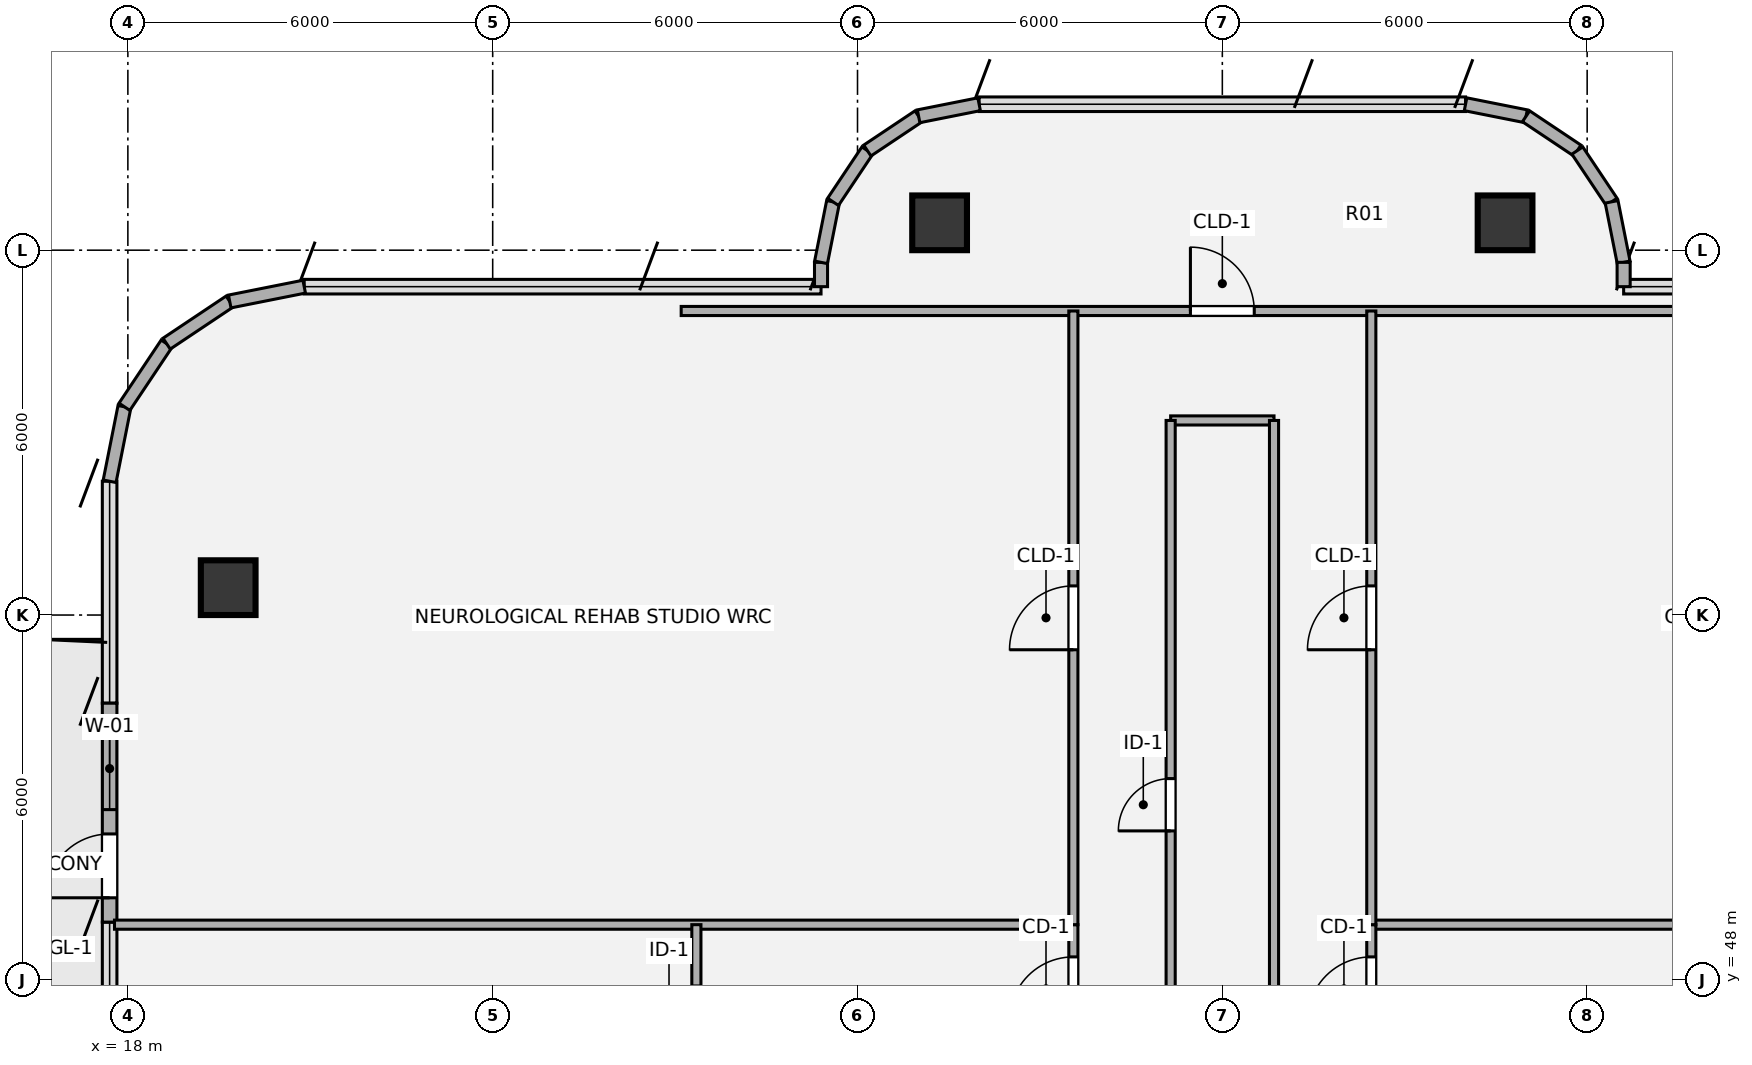
"""IFC4 building model, lengths in metres.
Left out: names, types, materials, properties, quantities, classifications, styles, units other than length and angle.
Written with IfcOpenShell. Run it as: python <this file> out.ifc"""

import sys

from ifc_helpers import new_model, si_unit, direction, frame, frame_2d, origin, origin_2d, place, context, subcontext, project, spatial, rectangle, hollow_circle, extrude, source, transform, mapped, element, fill, save


model = new_model("IFC4")
c1 = context("Model", 3, precision=1e-05, world=origin(), true_north=direction((0.0, 1.0)))
c2 = subcontext(c1, "Body", "Model", "MODEL_VIEW")
j1 = project(units=[si_unit("LENGTHUNIT", "METRE"), si_unit("PLANEANGLEUNIT", "RADIAN")], contexts=[c1])
p1 = place(None, origin())
s1 = spatial("IfcSite", under=j1, at=p1, CompositionType="ELEMENT")
p2 = place(p1, origin())
s2 = spatial("IfcBuilding", under=s1, at=p2, CompositionType="ELEMENT")
p3 = place(p2, frame((0.0, 0.0, 249.48)))
s3 = spatial("IfcBuildingStorey", under=s2, at=p3, CompositionType="ELEMENT", Elevation=249.48)
m1 = source(origin(), c2, "Body", "SweptSolid", [
    extrude(hollow_circle(Radius=0.45, WallThickness=0.032, at=origin_2d()), origin(), (0.0, 0.0, 1.0), 3.78),
])
for number, where, z_axis, x_axis in (
    (1, (19.65, 54.45, 0.0), (0.0, 0.0, 1.0), (1.0, 0.0, 0.0)),
    (2, (31.35, 60.45, 0.0), (0.0, 0.0, 1.0), (1.0, 0.0, 0.0)),
    (3, (40.65, 60.45, 0.0), (0.0, 0.0, 1.0), (1.0, 0.0, 0.0)),
):
    element("IfcColumn", number, at=place(p3, frame(where, z_axis=z_axis, x_axis=x_axis)), inside=s3, PredefinedType="COLUMN", context=c2, shape_type="MappedRepresentation", body=[
        mapped(m1, transform((0.0, 0.0, 0.0), x_axis=(1.0, 0.0, 0.0), y_axis=(0.0, 1.0, 0.0), z_axis=(0.0, 0.0, 1.0), scale=1.0)),
    ])
p4 = place(p3, frame((17.7, 48.95, 0.0), z_axis=(0.0, 0.0, 1.0), x_axis=(0.0, 1.0, 0.0)))
e4 = element("IfcWall", 4, at=p4, inside=s3, PredefinedType="SOLIDWALL", context=c2, shape_type="SweptSolid", body=[
    extrude(rectangle(XDim=3.6, YDim=0.24, at=frame_2d((1.8, 0.0))), origin(), (0.0, 0.0, 1.0), 3.53),
])
p5 = place(p4, frame((0.4, 0.0, 0.0)))
e5 = element("IfcOpeningElement", 5, at=p5, cuts=e4, PredefinedType="OPENING", context=c2, shape_type="SweptSolid", body=[
    extrude(rectangle(XDim=1.05, YDim=2.15, at=origin_2d()), frame((0.525, 0.13, 1.075), z_axis=(0.0, -1.0, 0.0), x_axis=(1.0, 0.0, 0.0)), (0.0, 0.0, 1.0), 0.26),
])
p6 = place(p4, frame((1.85, 0.0, 0.85)))
e6 = element("IfcOpeningElement", 6, at=p6, cuts=e4, PredefinedType="OPENING", context=c2, shape_type="SweptSolid", body=[
    extrude(rectangle(XDim=1.35, YDim=1.35, at=origin_2d()), frame((0.675, 0.13, 0.675), z_axis=(0.0, -1.0, 0.0), x_axis=(1.0, 0.0, 0.0)), (0.0, 0.0, 1.0), 0.26),
])
for number, where, z_axis, x_axis in (
    (7, (17.7, 56.2, 0.0), (0.0, 0.0, 1.0), (0.195, 0.981, 0.0)),
    (8, (17.944, 57.425, 0.0), (0.0, 0.0, 1.0), (0.556, 0.831, 0.0)),
    (9, (18.637, 58.463, 0.0), (0.0, 0.0, 1.0), (0.831, 0.556, 0.0)),
    (10, (19.675, 59.156, 0.0), (0.0, 0.0, 1.0), (0.981, 0.195, 0.0)),
):
    element("IfcWall", number, at=place(p3, frame(where, z_axis=z_axis, x_axis=x_axis)), inside=s3, PredefinedType="SOLIDWALL", context=c2, shape_type="SweptSolid", body=[
        extrude(rectangle(XDim=1.249, YDim=0.215, at=frame_2d((0.624, 0.0))), origin(), (0.0, 0.0, 1.0), 3.53),
    ])
p7 = place(p3, frame((29.4, 59.4, 0.0), z_axis=(0.0, 0.0, 1.0), x_axis=(0.0, 1.0, 0.0)))
e11 = element("IfcWall", 11, at=p7, inside=s3, PredefinedType="SOLIDWALL", context=c2, shape_type="SweptSolid", body=[
    extrude(rectangle(XDim=0.4, YDim=0.215, at=frame_2d((0.2, 0.0))), origin(), (0.0, 0.0, 1.0), 3.53),
])
p8 = place(p3, frame((29.4, 59.8, 0.0), z_axis=(0.0, 0.0, 1.0), x_axis=(0.195190360752, 0.980765376158, 0.0)))
e12 = element("IfcWall", 12, at=p8, inside=s3, PredefinedType="SOLIDWALL", context=c2, shape_type="SweptSolid", body=[
    extrude(rectangle(XDim=1.014, YDim=0.215, at=frame_2d((0.507, 0.0))), origin(), (0.0, 0.0, 1.0), 3.53),
])
p9 = place(p3, frame((29.598, 60.795, 0.0), z_axis=(0.0, 0.0, 1.0), x_axis=(0.555643898837, 0.831420385657, 0.0)))
e13 = element("IfcWall", 13, at=p9, inside=s3, PredefinedType="SOLIDWALL", context=c2, shape_type="SweptSolid", body=[
    extrude(rectangle(XDim=1.015, YDim=0.215, at=frame_2d((0.507, 0.0))), origin(), (0.0, 0.0, 1.0), 3.53),
])
p10 = place(p3, frame((30.162, 61.638, 0.0), z_axis=(0.0, 0.0, 1.0), x_axis=(0.831346067305, 0.555755086685, 0.0)))
e14 = element("IfcWall", 14, at=p10, inside=s3, PredefinedType="SOLIDWALL", context=c2, shape_type="SweptSolid", body=[
    extrude(rectangle(XDim=1.014, YDim=0.215, at=frame_2d((0.507, 0.0))), origin(), (0.0, 0.0, 1.0), 3.53),
])
for number, where, z_axis, x_axis in (
    (15, (31.005, 62.202, 0.0), (0.0, 0.0, 1.0), (0.981, 0.195, 0.0)),
    (16, (40.0, 62.4, 0.0), (0.0, 0.0, 1.0), (0.981, -0.195, 0.0)),
):
    element("IfcWall", number, at=place(p3, frame(where, z_axis=z_axis, x_axis=x_axis)), inside=s3, PredefinedType="SOLIDWALL", context=c2, shape_type="SweptSolid", body=[
        extrude(rectangle(XDim=1.015, YDim=0.215, at=frame_2d((0.507, 0.0))), origin(), (0.0, 0.0, 1.0), 3.53),
    ])
p11 = place(p3, frame((40.995, 62.202, 0.0), z_axis=(0.0, 0.0, 1.0), x_axis=(0.831346067305, -0.555755086685, 0.0)))
e17 = element("IfcWall", 17, at=p11, inside=s3, PredefinedType="SOLIDWALL", context=c2, shape_type="SweptSolid", body=[
    extrude(rectangle(XDim=1.014, YDim=0.215, at=frame_2d((0.507, 0.0))), origin(), (0.0, 0.0, 1.0), 3.53),
])
p12 = place(p3, frame((41.838, 61.638, 0.0), z_axis=(0.0, 0.0, 1.0), x_axis=(0.555643898837, -0.831420385657, 0.0)))
e18 = element("IfcWall", 18, at=p12, inside=s3, PredefinedType="SOLIDWALL", context=c2, shape_type="SweptSolid", body=[
    extrude(rectangle(XDim=1.015, YDim=0.215, at=frame_2d((0.507, 0.0))), origin(), (0.0, 0.0, 1.0), 3.53),
])
p13 = place(p3, frame((42.402, 60.795, 0.0), z_axis=(0.0, 0.0, 1.0), x_axis=(0.195190360752, -0.980765376158, 0.0)))
e19 = element("IfcWall", 19, at=p13, inside=s3, PredefinedType="SOLIDWALL", context=c2, shape_type="SweptSolid", body=[
    extrude(rectangle(XDim=1.014, YDim=0.215, at=frame_2d((0.507, 0.0))), origin(), (0.0, 0.0, 1.0), 3.53),
])
p14 = place(p3, frame((42.6, 59.8, 0.0), z_axis=(0.0, 0.0, 1.0), x_axis=(0.0, -1.0, 0.0)))
e20 = element("IfcWall", 20, at=p14, inside=s3, PredefinedType="SOLIDWALL", context=c2, shape_type="SweptSolid", body=[
    extrude(rectangle(XDim=0.4, YDim=0.215, at=frame_2d((0.2, 0.0))), origin(), (0.0, 0.0, 1.0), 3.53),
])
for number, where, z_axis, x_axis in (
    (21, (17.78, 48.908, 0.0), (0.0, 0.0, 1.0), (1.0, 0.0, 0.0)),
    (22, (38.45, 48.908, 0.0), (0.0, 0.0, 1.0), (1.0, 0.0, 0.0)),
):
    element("IfcWall", number, at=place(p3, frame(where, z_axis=z_axis, x_axis=x_axis)), inside=s3, PredefinedType="PARTITIONING", context=c2, shape_type="SweptSolid", body=[
        extrude(rectangle(XDim=15.77, YDim=0.15, at=frame_2d((7.885, 0.0))), origin(), (0.0, 0.0, 1.0), 2.982),
    ])
p15 = place(p3, frame((35.15, 57.2, 0.0), z_axis=(0.0, 0.0, 1.0), x_axis=(1.0, 0.0, 0.0)))
e23 = element("IfcWall", 23, at=p15, inside=s3, PredefinedType="PARTITIONING", context=c2, shape_type="SweptSolid", body=[
    extrude(rectangle(XDim=1.7, YDim=0.15, at=frame_2d((0.85, 0.0))), origin(), (0.0, 0.0, 1.0), 3.308),
])
p16 = place(p3, frame((27.1, 59.0, 0.0), z_axis=(0.0, 0.0, 1.0), x_axis=(1.0, 0.0, 0.0)))
e24 = element("IfcWall", 24, at=p16, inside=s3, PredefinedType="PARTITIONING", context=c2, shape_type="SweptSolid", body=[
    extrude(rectangle(XDim=17.8, YDim=0.15, at=frame_2d((8.9, 0.0))), origin(), (0.0, 0.0, 1.0), 3.308),
])
p17 = place(p16, frame((8.375, 0.0, 0.0)))
e25 = element("IfcOpeningElement", 25, at=p17, cuts=e24, PredefinedType="OPENING", context=c2, shape_type="SweptSolid", body=[
    extrude(rectangle(XDim=1.05, YDim=2.1, at=origin_2d()), frame((0.525, 0.085, 1.05), z_axis=(0.0, -1.0, 0.0), x_axis=(1.0, 0.0, 0.0)), (0.0, 0.0, 1.0), 0.17),
])
p18 = place(p3, frame((27.35, 45.254, 0.0), z_axis=(0.0, 0.0, 1.0), x_axis=(0.0, 1.0, 0.0)))
e26 = element("IfcWall", 26, at=p18, inside=s3, PredefinedType="PARTITIONING", context=c2, shape_type="SweptSolid", body=[
    extrude(rectangle(XDim=3.654, YDim=0.15, at=frame_2d((1.827, 0.0))), origin(), (0.0, 0.0, 1.0), 3.5),
])
p19 = place(p18, frame((1.786, 0.0, 0.0)))
e27 = element("IfcOpeningElement", 27, at=p19, cuts=e26, PredefinedType="OPENING", context=c2, shape_type="SweptSolid", body=[
    extrude(rectangle(XDim=0.86, YDim=2.1, at=origin_2d()), frame((0.43, 0.085, 1.05), z_axis=(0.0, -1.0, 0.0), x_axis=(1.0, 0.0, 0.0)), (0.0, 0.0, 1.0), 0.17),
])
p20 = place(p3, frame((33.55, 46.789, 0.0), z_axis=(0.0, 0.0, 1.0), x_axis=(0.0, 1.0, 0.0)))
e28 = element("IfcWall", 28, at=p20, inside=s3, PredefinedType="PARTITIONING", context=c2, shape_type="SweptSolid", body=[
    extrude(rectangle(XDim=2.119, YDim=0.15, at=frame_2d((1.06, 0.0))), origin(), (0.0, 0.0, 1.0), 3.5),
])
p21 = place(p20, frame((0.539, 0.0, 0.0)))
e29 = element("IfcOpeningElement", 29, at=p21, cuts=e28, PredefinedType="OPENING", context=c2, shape_type="SweptSolid", body=[
    extrude(rectangle(XDim=1.05, YDim=2.1, at=origin_2d()), frame((0.525, 0.085, 1.05), z_axis=(0.0, -1.0, 0.0), x_axis=(1.0, 0.0, 0.0)), (0.0, 0.0, 1.0), 0.17),
])
p22 = place(p3, frame((33.55, 48.908, 0.0), z_axis=(0.0, 0.0, 1.0), x_axis=(0.0, 1.0, 0.0)))
e30 = element("IfcWall", 30, at=p22, inside=s3, PredefinedType="PARTITIONING", context=c2, shape_type="SweptSolid", body=[
    extrude(rectangle(XDim=10.092, YDim=0.15, at=frame_2d((5.046, 0.0))), origin(), (0.0, 0.0, 1.0), 3.5),
])
p23 = place(p22, frame((4.521, 0.0, 0.0)))
e31 = element("IfcOpeningElement", 31, at=p23, cuts=e30, PredefinedType="OPENING", context=c2, shape_type="SweptSolid", body=[
    extrude(rectangle(XDim=1.05, YDim=2.1, at=origin_2d()), frame((0.525, 0.085, 1.05), z_axis=(0.0, -1.0, 0.0), x_axis=(1.0, 0.0, 0.0)), (0.0, 0.0, 1.0), 0.17),
])
p24 = place(p3, frame((35.15, 44.62, 0.0), z_axis=(0.0, 0.0, 1.0), x_axis=(0.0, 1.0, 0.0)))
e32 = element("IfcWall", 32, at=p24, inside=s3, PredefinedType="PARTITIONING", context=c2, shape_type="SweptSolid", body=[
    extrude(rectangle(XDim=12.58, YDim=0.15, at=frame_2d((6.29, 0.0))), origin(), (0.0, 0.0, 1.0), 3.5),
])
p25 = place(p24, frame((5.83, 0.0, 0.0)))
e33 = element("IfcOpeningElement", 33, at=p25, cuts=e32, PredefinedType="OPENING", context=c2, shape_type="SweptSolid", body=[
    extrude(rectangle(XDim=0.86, YDim=2.1, at=origin_2d()), frame((0.43, 0.085, 1.05), z_axis=(0.0, -1.0, 0.0), x_axis=(1.0, 0.0, 0.0)), (0.0, 0.0, 1.0), 0.17),
])
p26 = place(p3, frame((36.85, 44.62, 0.0), z_axis=(0.0, 0.0, 1.0), x_axis=(0.0, 1.0, 0.0)))
e34 = element("IfcWall", 34, at=p26, inside=s3, PredefinedType="PARTITIONING", context=c2, shape_type="SweptSolid", body=[
    extrude(rectangle(XDim=12.58, YDim=0.15, at=frame_2d((6.29, 0.0))), origin(), (0.0, 0.0, 1.0), 3.5),
])
p27 = place(p3, frame((38.45, 46.789, 0.0), z_axis=(0.0, 0.0, 1.0), x_axis=(0.0, 1.0, 0.0)))
e35 = element("IfcWall", 35, at=p27, inside=s3, PredefinedType="PARTITIONING", context=c2, shape_type="SweptSolid", body=[
    extrude(rectangle(XDim=2.119, YDim=0.15, at=frame_2d((1.06, 0.0))), origin(), (0.0, 0.0, 1.0), 3.5),
])
p28 = place(p27, frame((0.539, 0.0, 0.0)))
e36 = element("IfcOpeningElement", 36, at=p28, cuts=e35, PredefinedType="OPENING", context=c2, shape_type="SweptSolid", body=[
    extrude(rectangle(XDim=1.05, YDim=2.1, at=origin_2d()), frame((0.525, 0.085, 1.05), z_axis=(0.0, -1.0, 0.0), x_axis=(1.0, 0.0, 0.0)), (0.0, 0.0, 1.0), 0.17),
])
p29 = place(p3, frame((38.45, 48.908, 0.0), z_axis=(0.0, 0.0, 1.0), x_axis=(0.0, 1.0, 0.0)))
e37 = element("IfcWall", 37, at=p29, inside=s3, PredefinedType="PARTITIONING", context=c2, shape_type="SweptSolid", body=[
    extrude(rectangle(XDim=10.092, YDim=0.15, at=frame_2d((5.046, 0.0))), origin(), (0.0, 0.0, 1.0), 3.5),
])
p30 = place(p29, frame((4.521, 0.0, 0.0)))
e38 = element("IfcOpeningElement", 38, at=p30, cuts=e37, PredefinedType="OPENING", context=c2, shape_type="SweptSolid", body=[
    extrude(rectangle(XDim=1.05, YDim=2.1, at=origin_2d()), frame((0.525, 0.085, 1.05), z_axis=(0.0, -1.0, 0.0), x_axis=(1.0, 0.0, 0.0)), (0.0, 0.0, 1.0), 0.17),
])
m2 = source(origin(), c2, "Body", "SweptSolid", [
    extrude(rectangle(XDim=1.05, YDim=2.15, at=origin_2d()), frame((0.525, 0.025, 1.075), z_axis=(0.0, -1.0, 0.0), x_axis=(1.0, 0.0, 0.0)), (0.0, 0.0, 1.0), 0.05),
])
p31 = place(p5, origin())
e39 = element("IfcDoor", 39, at=p31, inside=s3, OperationType="SINGLE_SWING_LEFT", PredefinedType="DOOR", context=c2, shape_type="MappedRepresentation", body=[
    mapped(m2, transform((0.0, 0.0, 0.0), x_axis=(1.0, 0.0, 0.0), y_axis=(0.0, 1.0, 0.0), z_axis=(0.0, 0.0, 1.0), scale=1.0)),
])
fill(e5, e39)
m3 = source(origin(), c2, "Body", "SweptSolid", [
    extrude(rectangle(XDim=1.35, YDim=1.35, at=origin_2d()), frame((0.675, 0.03, 0.675), z_axis=(0.0, -1.0, 0.0), x_axis=(1.0, 0.0, 0.0)), (0.0, 0.0, 1.0), 0.06),
])
p32 = place(p6, origin())
e40 = element("IfcWindow", 40, at=p32, inside=s3, PartitioningType="SINGLE_PANEL", PredefinedType="WINDOW", context=c2, shape_type="MappedRepresentation", body=[
    mapped(m3, transform((0.0, 0.0, 0.0), x_axis=(1.0, 0.0, 0.0), y_axis=(0.0, 1.0, 0.0), z_axis=(0.0, 0.0, 1.0), scale=1.0)),
])
fill(e6, e40)
m4 = source(origin(), c2, "Body", "SweptSolid", [
    extrude(rectangle(XDim=1.05, YDim=2.1, at=origin_2d()), frame((0.525, 0.025, 1.05), z_axis=(0.0, -1.0, 0.0), x_axis=(1.0, 0.0, 0.0)), (0.0, 0.0, 1.0), 0.05),
])
p33 = place(p17, origin())
e41 = element("IfcDoor", 41, at=p33, inside=s3, OperationType="SINGLE_SWING_LEFT", PredefinedType="DOOR", context=c2, shape_type="MappedRepresentation", body=[
    mapped(m4, transform((0.0, 0.0, 0.0), x_axis=(1.0, 0.0, 0.0), y_axis=(0.0, 1.0, 0.0), z_axis=(0.0, 0.0, 1.0), scale=1.0)),
])
fill(e25, e41)
m5 = source(origin(), c2, "Body", "SweptSolid", [
    extrude(rectangle(XDim=1.05, YDim=2.1, at=origin_2d()), frame((0.525, 0.025, 1.05), z_axis=(0.0, -1.0, 0.0), x_axis=(1.0, 0.0, 0.0)), (0.0, 0.0, 1.0), 0.05),
])
p34 = place(p21, origin())
e42 = element("IfcDoor", 42, at=p34, inside=s3, OperationType="SINGLE_SWING_LEFT", PredefinedType="DOOR", context=c2, shape_type="MappedRepresentation", body=[
    mapped(m5, transform((0.0, 0.0, 0.0), x_axis=(1.0, 0.0, 0.0), y_axis=(0.0, 1.0, 0.0), z_axis=(0.0, 0.0, 1.0), scale=1.0)),
])
fill(e29, e42)
p35 = place(p23, origin())
e43 = element("IfcDoor", 43, at=p35, inside=s3, OperationType="SINGLE_SWING_LEFT", PredefinedType="DOOR", context=c2, shape_type="MappedRepresentation", body=[
    mapped(m4, transform((0.0, 0.0, 0.0), x_axis=(1.0, 0.0, 0.0), y_axis=(0.0, 1.0, 0.0), z_axis=(0.0, 0.0, 1.0), scale=1.0)),
])
fill(e31, e43)
m6 = source(origin(), c2, "Body", "SweptSolid", [
    extrude(rectangle(XDim=0.86, YDim=2.1, at=origin_2d()), frame((0.43, 0.025, 1.05), z_axis=(0.0, -1.0, 0.0), x_axis=(1.0, 0.0, 0.0)), (0.0, 0.0, 1.0), 0.05),
])
p36 = place(p25, origin())
e44 = element("IfcDoor", 44, at=p36, inside=s3, OperationType="SINGLE_SWING_LEFT", PredefinedType="DOOR", context=c2, shape_type="MappedRepresentation", body=[
    mapped(m6, transform((0.0, 0.0, 0.0), x_axis=(1.0, 0.0, 0.0), y_axis=(0.0, 1.0, 0.0), z_axis=(0.0, 0.0, 1.0), scale=1.0)),
])
fill(e33, e44)
p37 = place(p28, origin())
e45 = element("IfcDoor", 45, at=p37, inside=s3, OperationType="SINGLE_SWING_LEFT", PredefinedType="DOOR", context=c2, shape_type="MappedRepresentation", body=[
    mapped(m5, transform((0.0, 0.0, 0.0), x_axis=(1.0, 0.0, 0.0), y_axis=(0.0, 1.0, 0.0), z_axis=(0.0, 0.0, 1.0), scale=1.0)),
])
fill(e36, e45)
p38 = place(p30, origin())
e46 = element("IfcDoor", 46, at=p38, inside=s3, OperationType="SINGLE_SWING_LEFT", PredefinedType="DOOR", context=c2, shape_type="MappedRepresentation", body=[
    mapped(m4, transform((0.0, 0.0, 0.0), x_axis=(1.0, 0.0, 0.0), y_axis=(0.0, 1.0, 0.0), z_axis=(0.0, 0.0, 1.0), scale=1.0)),
])
fill(e38, e46)
save(model, sys.argv[1])
